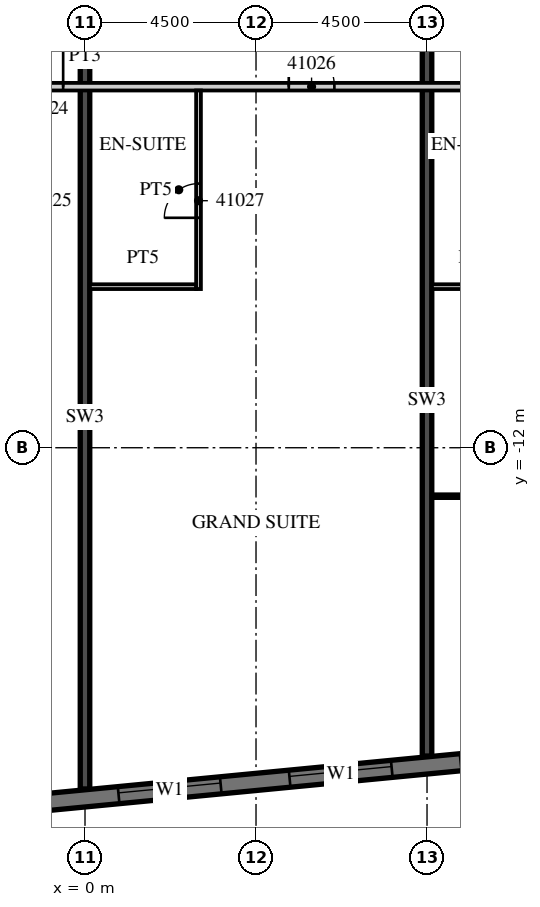
"""IFC4 building model, lengths in metres.
Left out: names, types, materials, properties, quantities, classifications, styles, units other than length and angle.
Written with IfcOpenShell. Run it as: python <this file> out.ifc"""

import sys

from ifc_helpers import new_model, si_unit, direction, frame, frame_2d, origin, place, context, subcontext, project, spatial, rectangle, extrude, element, fill, save


model = new_model("IFC4")
c1 = context("Model", 3, precision=1e-05, world=origin(), true_north=direction((0.0, 1.0)))
c2 = subcontext(c1, "Body", "Model", "MODEL_VIEW")
j1 = project(units=[si_unit("LENGTHUNIT", "METRE"), si_unit("PLANEANGLEUNIT", "RADIAN")], contexts=[c1])
p1 = place(None, origin())
s1 = spatial("IfcSite", under=j1, at=p1, CompositionType="ELEMENT")
p2 = place(p1, origin())
s2 = spatial("IfcBuilding", under=s1, at=p2, CompositionType="ELEMENT")
p3 = place(p2, frame((0.0, 0.0, 176.8)))
s3 = spatial("IfcBuildingStorey", under=s2, at=p3, CompositionType="ELEMENT", Elevation=176.8)
p4 = place(p3, frame((0.0, -20.979, 0.0), z_axis=(0.0, 0.0, 1.0), x_axis=(0.0, 1.0, 0.0)))
e1 = element("IfcWall", 1, at=p4, inside=s3, PredefinedType="SHEAR", context=c2, shape_type="SweptSolid", body=[
    extrude(rectangle(XDim=19.579, YDim=0.25, at=frame_2d((9.789, 0.0))), origin(), (0.0, 0.0, 1.0), 3.3),
])
p5 = place(p3, frame((9.0, -20.112, 0.0), z_axis=(0.0, 0.0, 1.0), x_axis=(0.0, 1.0, 0.0)))
e2 = element("IfcWall", 2, at=p5, inside=s3, PredefinedType="SHEAR", context=c2, shape_type="SweptSolid", body=[
    extrude(rectangle(XDim=18.712, YDim=0.25, at=frame_2d((9.356, 0.0))), origin(), (0.0, 0.0, 1.0), 3.3),
])
p6 = place(p3, frame((-13.521, -22.529, 0.0), z_axis=(0.0, 0.0, 1.0), x_axis=(0.995396436651, 0.095843277819, 0.0)))
e3 = element("IfcWall", 3, at=p6, inside=s3, PredefinedType="SOLIDWALL", context=c2, shape_type="SweptSolid", body=[
    extrude(rectangle(XDim=51.578, YDim=0.45, at=frame_2d((25.789, 0.0))), origin(), (0.0, 0.0, 1.0), 3.02),
])
p7 = place(p6, frame((0.91, 0.0, 0.45)))
e4 = element("IfcOpeningElement", 4, at=p7, cuts=e3, PredefinedType="OPENING", context=c2, shape_type="SweptSolid", body=[
    extrude(rectangle(XDim=2.7, YDim=2.25, at=frame_2d((1.35, 1.125))), frame((0.0, 0.235, 0.0), z_axis=(0.0, -1.0, 0.0), x_axis=(1.0, 0.0, 0.0)), (0.0, 0.0, 1.0), 0.47),
])
p8 = place(p6, frame((5.431, 0.0, 0.45)))
e5 = element("IfcOpeningElement", 5, at=p8, cuts=e3, PredefinedType="OPENING", context=c2, shape_type="SweptSolid", body=[
    extrude(rectangle(XDim=2.7, YDim=2.25, at=frame_2d((1.35, 1.125))), frame((0.0, 0.235, 0.0), z_axis=(0.0, -1.0, 0.0), x_axis=(1.0, 0.0, 0.0)), (0.0, 0.0, 1.0), 0.47),
])
p9 = place(p6, frame((9.952, 0.0, 0.45)))
e6 = element("IfcOpeningElement", 6, at=p9, cuts=e3, PredefinedType="OPENING", context=c2, shape_type="SweptSolid", body=[
    extrude(rectangle(XDim=2.7, YDim=2.25, at=frame_2d((1.35, 1.125))), frame((0.0, 0.235, 0.0), z_axis=(0.0, -1.0, 0.0), x_axis=(1.0, 0.0, 0.0)), (0.0, 0.0, 1.0), 0.47),
])
p10 = place(p6, frame((14.473, 0.0, 0.45)))
e7 = element("IfcOpeningElement", 7, at=p10, cuts=e3, PredefinedType="OPENING", context=c2, shape_type="SweptSolid", body=[
    extrude(rectangle(XDim=2.7, YDim=2.25, at=frame_2d((1.35, 1.125))), frame((0.0, 0.235, 0.0), z_axis=(0.0, -1.0, 0.0), x_axis=(1.0, 0.0, 0.0)), (0.0, 0.0, 1.0), 0.47),
])
p11 = place(p6, frame((18.994, 0.0, 0.45)))
e8 = element("IfcOpeningElement", 8, at=p11, cuts=e3, PredefinedType="OPENING", context=c2, shape_type="SweptSolid", body=[
    extrude(rectangle(XDim=2.7, YDim=2.25, at=frame_2d((1.35, 1.125))), frame((0.0, 0.235, 0.0), z_axis=(0.0, -1.0, 0.0), x_axis=(1.0, 0.0, 0.0)), (0.0, 0.0, 1.0), 0.47),
])
p12 = place(p6, frame((23.514, 0.0, 0.45)))
e9 = element("IfcOpeningElement", 9, at=p12, cuts=e3, PredefinedType="OPENING", context=c2, shape_type="SweptSolid", body=[
    extrude(rectangle(XDim=2.7, YDim=2.25, at=frame_2d((1.35, 1.125))), frame((0.0, 0.235, 0.0), z_axis=(0.0, -1.0, 0.0), x_axis=(1.0, 0.0, 0.0)), (0.0, 0.0, 1.0), 0.47),
])
p13 = place(p6, frame((28.035, 0.0, 0.45)))
e10 = element("IfcOpeningElement", 10, at=p13, cuts=e3, PredefinedType="OPENING", context=c2, shape_type="SweptSolid", body=[
    extrude(rectangle(XDim=2.7, YDim=2.25, at=frame_2d((1.35, 1.125))), frame((0.0, 0.235, 0.0), z_axis=(0.0, -1.0, 0.0), x_axis=(1.0, 0.0, 0.0)), (0.0, 0.0, 1.0), 0.47),
])
p14 = place(p6, frame((32.556, 0.0, 0.45)))
e11 = element("IfcOpeningElement", 11, at=p14, cuts=e3, PredefinedType="OPENING", context=c2, shape_type="SweptSolid", body=[
    extrude(rectangle(XDim=2.7, YDim=2.25, at=frame_2d((1.35, 1.125))), frame((0.0, 0.235, 0.0), z_axis=(0.0, -1.0, 0.0), x_axis=(1.0, 0.0, 0.0)), (0.0, 0.0, 1.0), 0.47),
])
p15 = place(p6, frame((37.077, 0.0, 0.45)))
e12 = element("IfcOpeningElement", 12, at=p15, cuts=e3, PredefinedType="OPENING", context=c2, shape_type="SweptSolid", body=[
    extrude(rectangle(XDim=2.7, YDim=2.25, at=frame_2d((1.35, 1.125))), frame((0.0, 0.235, 0.0), z_axis=(0.0, -1.0, 0.0), x_axis=(1.0, 0.0, 0.0)), (0.0, 0.0, 1.0), 0.47),
])
p16 = place(p6, frame((41.598, 0.0, 0.45)))
e13 = element("IfcOpeningElement", 13, at=p16, cuts=e3, PredefinedType="OPENING", context=c2, shape_type="SweptSolid", body=[
    extrude(rectangle(XDim=2.7, YDim=2.25, at=frame_2d((1.35, 1.125))), frame((0.0, 0.235, 0.0), z_axis=(0.0, -1.0, 0.0), x_axis=(1.0, 0.0, 0.0)), (0.0, 0.0, 1.0), 0.47),
])
p17 = place(p6, frame((46.119, 0.0, 0.45)))
e14 = element("IfcOpeningElement", 14, at=p17, cuts=e3, PredefinedType="OPENING", context=c2, shape_type="SweptSolid", body=[
    extrude(rectangle(XDim=2.7, YDim=2.25, at=frame_2d((1.35, 1.125))), frame((0.0, 0.235, 0.0), z_axis=(0.0, -1.0, 0.0), x_axis=(1.0, 0.0, 0.0)), (0.0, 0.0, 1.0), 0.47),
])
p18 = place(p3, frame((-13.5, -2.5, 0.0), z_axis=(0.0, 0.0, 1.0), x_axis=(1.0, 0.0, 0.0)))
e15 = element("IfcWall", 15, at=p18, inside=s3, PredefinedType="PARTITIONING", context=c2, shape_type="SweptSolid", body=[
    extrude(rectangle(XDim=27.0, YDim=0.2, at=frame_2d((13.5, 0.0))), origin(), (0.0, 0.0, 1.0), 3.02),
])
p19 = place(p18, frame((2.925, 0.0, 0.0)))
e16 = element("IfcOpeningElement", 16, at=p19, cuts=e15, PredefinedType="OPENING", context=c2, shape_type="SweptSolid", body=[
    extrude(rectangle(XDim=1.0, YDim=2.1, at=frame_2d((0.5, 1.05))), frame((0.0, 0.11, 0.0), z_axis=(0.0, -1.0, 0.0), x_axis=(1.0, 0.0, 0.0)), (0.0, 0.0, 1.0), 0.22),
])
p20 = place(p18, frame((7.45, 0.0, 0.0)))
e17 = element("IfcOpeningElement", 17, at=p20, cuts=e15, PredefinedType="OPENING", context=c2, shape_type="SweptSolid", body=[
    extrude(rectangle(XDim=1.0, YDim=2.1, at=frame_2d((0.5, 1.05))), frame((0.0, 0.11, 0.0), z_axis=(0.0, -1.0, 0.0), x_axis=(1.0, 0.0, 0.0)), (0.0, 0.0, 1.0), 0.22),
])
p21 = place(p18, frame((11.925, 0.0, 0.0)))
e18 = element("IfcOpeningElement", 18, at=p21, cuts=e15, PredefinedType="OPENING", context=c2, shape_type="SweptSolid", body=[
    extrude(rectangle(XDim=1.0, YDim=2.1, at=frame_2d((0.5, 1.05))), frame((0.0, 0.11, 0.0), z_axis=(0.0, -1.0, 0.0), x_axis=(1.0, 0.0, 0.0)), (0.0, 0.0, 1.0), 0.22),
])
p22 = place(p18, frame((18.862, 0.0, 0.0)))
e19 = element("IfcOpeningElement", 19, at=p22, cuts=e15, PredefinedType="OPENING", context=c2, shape_type="SweptSolid", body=[
    extrude(rectangle(XDim=1.2, YDim=2.1, at=frame_2d((0.6, 1.05))), frame((0.0, 0.11, 0.0), z_axis=(0.0, -1.0, 0.0), x_axis=(1.0, 0.0, 0.0)), (0.0, 0.0, 1.0), 0.22),
])
p23 = place(p18, frame((25.425, 0.0, 0.0)))
e20 = element("IfcOpeningElement", 20, at=p23, cuts=e15, PredefinedType="OPENING", context=c2, shape_type="SweptSolid", body=[
    extrude(rectangle(XDim=1.0, YDim=2.1, at=frame_2d((0.5, 1.05))), frame((0.0, 0.11, 0.0), z_axis=(0.0, -1.0, 0.0), x_axis=(1.0, 0.0, 0.0)), (0.0, 0.0, 1.0), 0.22),
])
p24 = place(p3, frame((2.987, -7.825, 0.0), z_axis=(0.0, 0.0, 1.0), x_axis=(0.0, 1.0, 0.0)))
e21 = element("IfcWall", 21, at=p24, inside=s3, PredefinedType="PARTITIONING", context=c2, shape_type="SweptSolid", body=[
    extrude(rectangle(XDim=5.225, YDim=0.125, at=frame_2d((2.612, 0.0))), origin(), (0.0, 0.0, 1.0), 3.02),
])
p25 = place(p24, frame((1.875, 0.0, 0.0)))
e22 = element("IfcOpeningElement", 22, at=p25, cuts=e21, PredefinedType="OPENING", context=c2, shape_type="SweptSolid", body=[
    extrude(rectangle(XDim=0.9, YDim=2.1, at=frame_2d((0.45, 1.05))), frame((0.0, 0.073, 0.0), z_axis=(0.0, -1.0, 0.0), x_axis=(1.0, 0.0, 0.0)), (0.0, 0.0, 1.0), 0.145),
])
p26 = place(p3, frame((0.125, -7.762, 0.0), z_axis=(0.0, 0.0, 1.0), x_axis=(1.0, 0.0, 0.0)))
e23 = element("IfcWall", 23, at=p26, inside=s3, PredefinedType="PARTITIONING", context=c2, shape_type="SweptSolid", body=[
    extrude(rectangle(XDim=2.8, YDim=0.125, at=frame_2d((1.4, 0.0))), origin(), (0.0, 0.0, 1.0), 3.02),
])
p27 = place(p3, frame((9.125, -7.762, 0.0), z_axis=(0.0, 0.0, 1.0), x_axis=(1.0, 0.0, 0.0)))
e24 = element("IfcWall", 24, at=p27, inside=s3, PredefinedType="PARTITIONING", context=c2, shape_type="SweptSolid", body=[
    extrude(rectangle(XDim=2.25, YDim=0.125, at=frame_2d((1.125, 0.0))), origin(), (0.0, 0.0, 1.0), 3.02),
])
p28 = place(p3, frame((9.125, -13.275, 0.0), z_axis=(0.0, 0.0, 1.0), x_axis=(1.0, 0.0, 0.0)))
e25 = element("IfcWall", 25, at=p28, inside=s3, PredefinedType="PARTITIONING", context=c2, shape_type="SweptSolid", body=[
    extrude(rectangle(XDim=4.275, YDim=0.1, at=frame_2d((2.137, 0.0))), origin(), (0.0, 0.0, 1.0), 3.02),
])
p29 = place(p28, frame((0.787, 0.0, 0.0)))
e26 = element("IfcOpeningElement", 26, at=p29, cuts=e25, PredefinedType="OPENING", context=c2, shape_type="SweptSolid", body=[
    extrude(rectangle(XDim=1.5, YDim=2.1, at=frame_2d((0.75, 1.05))), frame((0.0, 0.06, 0.0), z_axis=(0.0, -1.0, 0.0), x_axis=(1.0, 0.0, 0.0)), (0.0, 0.0, 1.0), 0.12),
])
p30 = place(p10, origin())
e27 = element("IfcWindow", 27, at=p30, inside=s3, PartitioningType="SINGLE_PANEL", PredefinedType="WINDOW", context=c2, shape_type="SweptSolid", body=[
    extrude(rectangle(XDim=2.7, YDim=2.25, at=frame_2d((1.35, 1.125))), frame((0.0, 0.09, 0.0), z_axis=(0.0, -1.0, 0.0), x_axis=(1.0, 0.0, 0.0)), (0.0, 0.0, 1.0), 0.06),
])
fill(e7, e27)
p31 = place(p11, origin())
e28 = element("IfcWindow", 28, at=p31, inside=s3, PartitioningType="SINGLE_PANEL", PredefinedType="WINDOW", context=c2, shape_type="SweptSolid", body=[
    extrude(rectangle(XDim=2.7, YDim=2.25, at=frame_2d((1.35, 1.125))), frame((0.0, 0.09, 0.0), z_axis=(0.0, -1.0, 0.0), x_axis=(1.0, 0.0, 0.0)), (0.0, 0.0, 1.0), 0.06),
])
fill(e8, e28)
p32 = place(p21, origin())
e29 = element("IfcDoor", 29, at=p32, inside=s3, OperationType="SINGLE_SWING_RIGHT", PredefinedType="DOOR", context=c2, shape_type="SweptSolid", body=[
    extrude(rectangle(XDim=1.0, YDim=2.1, at=frame_2d((0.5, 1.05))), frame((0.0, 0.025, 0.0), z_axis=(0.0, -1.0, 0.0), x_axis=(1.0, 0.0, 0.0)), (0.0, 0.0, 1.0), 0.05),
])
fill(e18, e29)
p33 = place(p22, origin())
e30 = element("IfcDoor", 30, at=p33, inside=s3, OperationType="SINGLE_SWING_LEFT", PredefinedType="DOOR", context=c2, shape_type="SweptSolid", body=[
    extrude(rectangle(XDim=1.2, YDim=2.1, at=frame_2d((0.6, 1.05))), frame((0.0, 0.025, 0.0), z_axis=(0.0, -1.0, 0.0), x_axis=(1.0, 0.0, 0.0)), (0.0, 0.0, 1.0), 0.05),
])
fill(e19, e30)
p34 = place(p25, origin())
e31 = element("IfcDoor", 31, at=p34, inside=s3, OperationType="SINGLE_SWING_LEFT", PredefinedType="DOOR", context=c2, shape_type="SweptSolid", body=[
    extrude(rectangle(XDim=0.9, YDim=2.1, at=frame_2d((0.45, 1.05))), frame((0.0, 0.025, 0.0), z_axis=(0.0, -1.0, 0.0), x_axis=(1.0, 0.0, 0.0)), (0.0, 0.0, 1.0), 0.05),
])
fill(e22, e31)
save(model, sys.argv[1])
